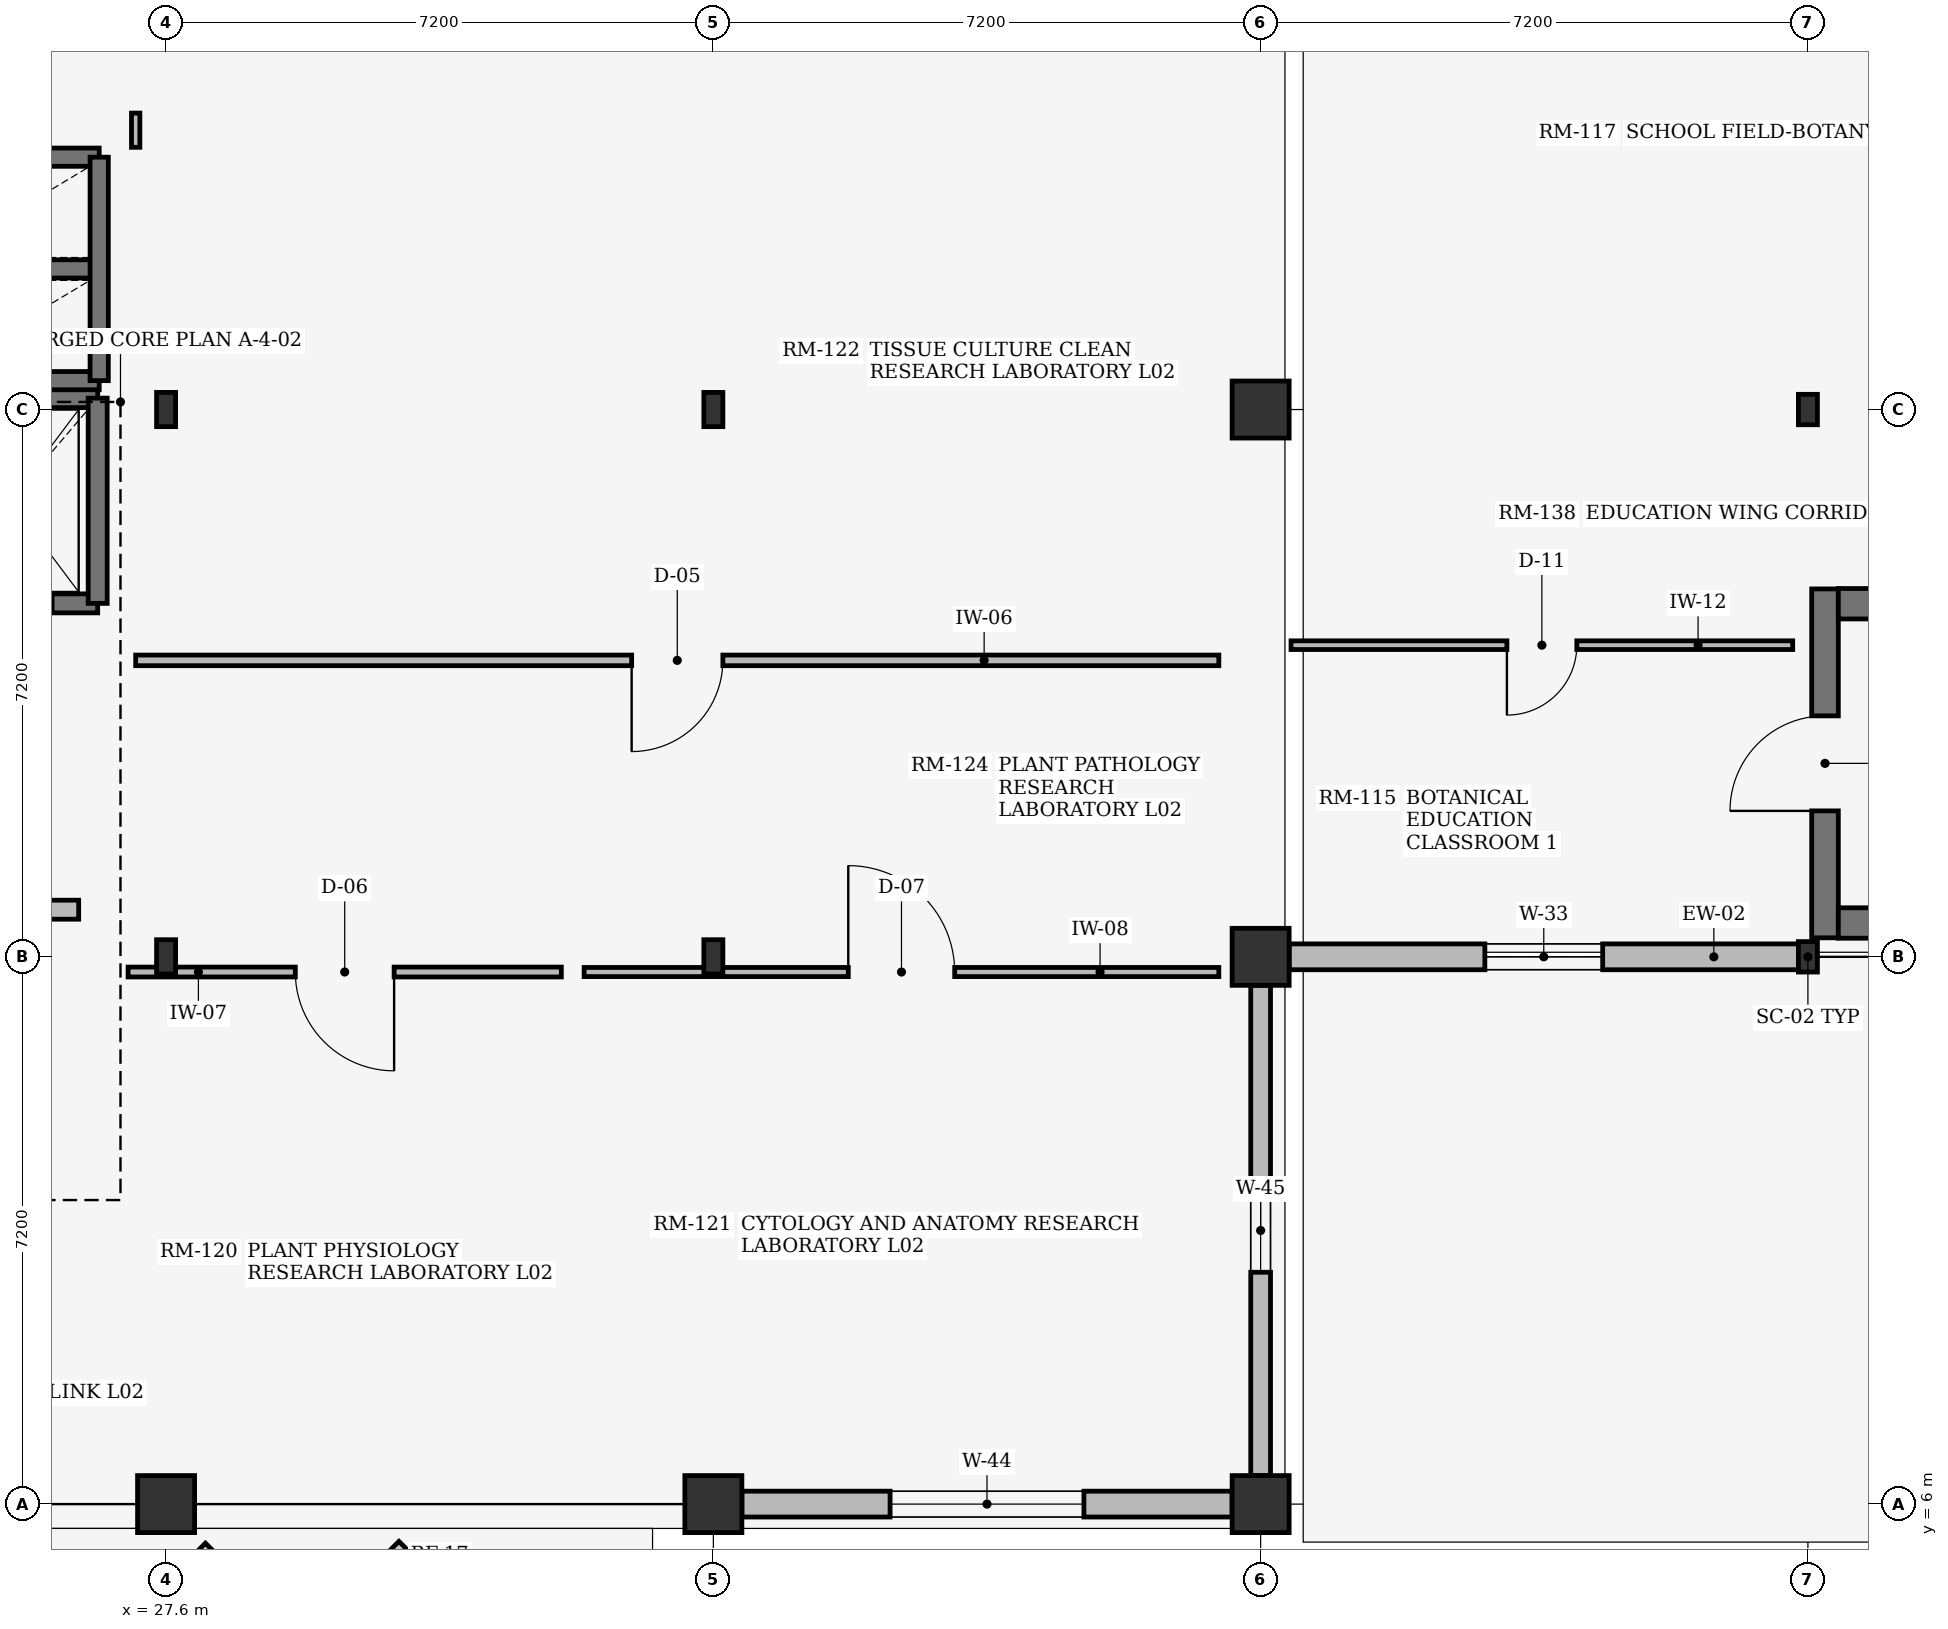
"""IFC4 building model, lengths in metres.
Left out: names, types, materials, properties, quantities, classifications, styles, units other than length and angle.
Written with IfcOpenShell. Run it as: python <this file> out.ifc"""

import sys

from ifc_helpers import new_model, si_unit, direction, frame, frame_2d, origin, origin_2d, place, context, subcontext, project, spatial, rectangle, i_section, extrude, element, fill, save


model = new_model("IFC4")
c1 = context("Model", 3, precision=1e-05, world=origin(), true_north=direction((0.0, 1.0)))
c2 = subcontext(c1, "Body", "Model", "MODEL_VIEW")
j1 = project(units=[si_unit("LENGTHUNIT", "METRE"), si_unit("PLANEANGLEUNIT", "RADIAN")], contexts=[c1])
p1 = place(None, origin())
s1 = spatial("IfcSite", under=j1, at=p1, CompositionType="ELEMENT")
p2 = place(p1, origin())
s2 = spatial("IfcBuilding", under=s1, at=p2, CompositionType="ELEMENT")
p3 = place(p2, frame((0.0, 0.0, 9.0)))
s3 = spatial("IfcBuildingStorey", under=s2, at=p3, CompositionType="ELEMENT", Elevation=9.0)
p4 = place(p3, frame((27.6, 6.0, 0.0), z_axis=(0.0, 0.0, 1.0), x_axis=(1.0, 0.0, 0.0)))
e1 = element("IfcColumn", 1, at=p4, inside=s3, PredefinedType="COLUMN", context=c2, shape_type="SweptSolid", body=[
    extrude(rectangle(XDim=0.75, YDim=0.75, at=origin_2d()), origin(), (0.0, 0.0, 1.0), 3.96),
])
for number, where, z_axis, x_axis in (
    (2, (27.6, 13.2, 0.0), (0.0, 0.0, 1.0), (1.0, 0.0, 0.0)),
    (3, (27.6, 20.4, 0.0), (0.0, 0.0, 1.0), (1.0, 0.0, 0.0)),
):
    element("IfcColumn", number, at=place(p3, frame(where, z_axis=z_axis, x_axis=x_axis)), inside=s3, PredefinedType="COLUMN", context=c2, shape_type="SweptSolid", body=[
        extrude(i_section(OverallWidth=0.25, OverallDepth=0.45, WebThickness=0.011, FlangeThickness=0.014, at=origin_2d()), origin(), (0.0, 0.0, 1.0), 3.96),
    ])
p5 = place(p3, frame((34.8, 6.0, 0.0), z_axis=(0.0, 0.0, 1.0), x_axis=(1.0, 0.0, 0.0)))
e4 = element("IfcColumn", 4, at=p5, inside=s3, PredefinedType="COLUMN", context=c2, shape_type="SweptSolid", body=[
    extrude(rectangle(XDim=0.75, YDim=0.75, at=origin_2d()), origin(), (0.0, 0.0, 1.0), 3.96),
])
for number, where, z_axis, x_axis in (
    (5, (34.8, 13.2, 0.0), (0.0, 0.0, 1.0), (1.0, 0.0, 0.0)),
    (6, (34.8, 20.4, 0.0), (0.0, 0.0, 1.0), (1.0, 0.0, 0.0)),
):
    element("IfcColumn", number, at=place(p3, frame(where, z_axis=z_axis, x_axis=x_axis)), inside=s3, PredefinedType="COLUMN", context=c2, shape_type="SweptSolid", body=[
        extrude(i_section(OverallWidth=0.25, OverallDepth=0.45, WebThickness=0.011, FlangeThickness=0.014, at=origin_2d()), origin(), (0.0, 0.0, 1.0), 3.96),
    ])
for number, where, z_axis, x_axis in (
    (7, (42.0, 6.0, 0.0), (0.0, 0.0, 1.0), (1.0, 0.0, 0.0)),
    (8, (42.0, 13.2, 0.0), (0.0, 0.0, 1.0), (1.0, 0.0, 0.0)),
    (9, (42.0, 20.4, 0.0), (0.0, 0.0, 1.0), (1.0, 0.0, 0.0)),
):
    element("IfcColumn", number, at=place(p3, frame(where, z_axis=z_axis, x_axis=x_axis)), inside=s3, PredefinedType="COLUMN", context=c2, shape_type="SweptSolid", body=[
        extrude(rectangle(XDim=0.75, YDim=0.75, at=origin_2d()), origin(), (0.0, 0.0, 1.0), 3.96),
    ])
for number, where, z_axis, x_axis in (
    (10, (49.2, 13.2, 0.0), (0.0, 0.0, 1.0), (1.0, 0.0, 0.0)),
    (11, (49.2, 20.4, 0.0), (0.0, 0.0, 1.0), (1.0, 0.0, 0.0)),
):
    element("IfcColumn", number, at=place(p3, frame(where, z_axis=z_axis, x_axis=x_axis)), inside=s3, PredefinedType="COLUMN", context=c2, shape_type="SweptSolid", body=[
        extrude(i_section(OverallWidth=0.25, OverallDepth=0.4, WebThickness=0.01, FlangeThickness=0.013, at=origin_2d()), origin(), (0.0, 0.0, 1.0), 3.96),
    ])
p6 = place(p3, frame((42.375, 13.2, 0.0), z_axis=(0.0, 0.0, 1.0), x_axis=(1.0, 0.0, 0.0)))
e12 = element("IfcWall", 12, at=p6, inside=s3, PredefinedType="STANDARD", context=c2, shape_type="SweptSolid", body=[
    extrude(rectangle(XDim=6.7, YDim=0.34, at=frame_2d((3.35, 0.0))), origin(), (0.0, 0.0, 1.0), 3.42),
])
p7 = place(p6, frame((2.575, 0.0, 0.75)))
e13 = element("IfcOpeningElement", 13, at=p7, cuts=e12, PredefinedType="OPENING", context=c2, shape_type="SweptSolid", body=[
    extrude(rectangle(XDim=1.55, YDim=1.35, at=frame_2d((0.775, 0.675))), frame((0.0, 0.18, 0.0), z_axis=(0.0, -1.0, 0.0), x_axis=(1.0, 0.0, 0.0)), (0.0, 0.0, 1.0), 0.36),
])
p8 = place(p3, frame((35.175, 6.0, 0.0), z_axis=(0.0, 0.0, 1.0), x_axis=(1.0, 0.0, 0.0)))
e14 = element("IfcWall", 14, at=p8, inside=s3, PredefinedType="STANDARD", context=c2, shape_type="SweptSolid", body=[
    extrude(rectangle(XDim=6.45, YDim=0.34, at=frame_2d((3.225, 0.0))), origin(), (0.0, 0.0, 1.0), 3.34),
])
p9 = place(p8, frame((1.95, 0.0, 0.75)))
e15 = element("IfcOpeningElement", 15, at=p9, cuts=e14, PredefinedType="OPENING", context=c2, shape_type="SweptSolid", body=[
    extrude(rectangle(XDim=2.55, YDim=1.5, at=frame_2d((1.275, 0.75))), frame((0.0, 0.18, 0.0), z_axis=(0.0, -1.0, 0.0), x_axis=(1.0, 0.0, 0.0)), (0.0, 0.0, 1.0), 0.36),
])
p10 = place(p3, frame((42.0, 6.375, 0.0), z_axis=(0.0, 0.0, 1.0), x_axis=(0.0, 1.0, 0.0)))
e16 = element("IfcWall", 16, at=p10, inside=s3, PredefinedType="STANDARD", context=c2, shape_type="SweptSolid", body=[
    extrude(rectangle(XDim=6.45, YDim=0.26, at=frame_2d((3.225, 0.0))), origin(), (0.0, 0.0, 1.0), 3.34),
])
p11 = place(p10, frame((2.675, 0.0, 0.75)))
e17 = element("IfcOpeningElement", 17, at=p11, cuts=e16, PredefinedType="OPENING", context=c2, shape_type="SweptSolid", body=[
    extrude(rectangle(XDim=1.1, YDim=1.25, at=frame_2d((0.55, 0.625))), frame((0.0, 0.14, 0.0), z_axis=(0.0, -1.0, 0.0), x_axis=(1.0, 0.0, 0.0)), (0.0, 0.0, 1.0), 0.28),
])
p12 = place(p3, frame((49.425, 13.45, 0.0), z_axis=(0.0, 0.0, 1.0), x_axis=(0.0, 1.0, 0.0)))
e18 = element("IfcWall", 18, at=p12, inside=s3, PredefinedType="SHEAR", context=c2, shape_type="SweptSolid", body=[
    extrude(rectangle(XDim=4.59, YDim=0.35, at=frame_2d((2.295, 0.0))), origin(), (0.0, 0.0, 1.0), 3.96),
])
p13 = place(p12, frame((1.67, 0.0, 0.0)))
e19 = element("IfcOpeningElement", 19, at=p13, cuts=e18, PredefinedType="OPENING", context=c2, shape_type="SweptSolid", body=[
    extrude(rectangle(XDim=1.25, YDim=2.2, at=frame_2d((0.625, 1.1))), frame((0.0, 0.185, 0.0), z_axis=(0.0, -1.0, 0.0), x_axis=(1.0, 0.0, 0.0)), (0.0, 0.0, 1.0), 0.37),
])
for number, where, z_axis, x_axis in (
    (20, (49.6, 13.645, 0.0), (0.0, 0.0, 1.0), (1.0, 0.0, 0.0)),
    (21, (49.6, 17.845, 0.0), (0.0, 0.0, 1.0), (1.0, 0.0, 0.0)),
):
    element("IfcWall", number, at=place(p3, frame(where, z_axis=z_axis, x_axis=x_axis)), inside=s3, PredefinedType="SHEAR", context=c2, shape_type="SweptSolid", body=[
        extrude(rectangle(XDim=7.98, YDim=0.4, at=frame_2d((3.99, 0.0))), origin(), (0.0, 0.0, 1.0), 3.96),
    ])
p14 = place(p3, frame((24.4, 17.85, 0.0), z_axis=(0.0, 0.0, 1.0), x_axis=(1.0, 0.0, 0.0)))
e22 = element("IfcWall", 22, at=p14, inside=s3, PredefinedType="SHEAR", context=c2, shape_type="SweptSolid", body=[
    extrude(rectangle(XDim=2.3, YDim=0.25, at=frame_2d((1.15, 0.0))), origin(), (0.0, 0.0, 1.0), 3.96),
])
p15 = place(p14, frame((0.6, 0.0, 0.0)))
e23 = element("IfcOpeningElement", 23, at=p15, cuts=e22, PredefinedType="OPENING", context=c2, shape_type="SweptSolid", body=[
    extrude(rectangle(XDim=1.1, YDim=2.2, at=frame_2d((0.55, 1.1))), frame((0.0, 0.135, 0.0), z_axis=(0.0, -1.0, 0.0), x_axis=(1.0, 0.0, 0.0)), (0.0, 0.0, 1.0), 0.27),
])
p16 = place(p3, frame((24.4, 20.55, 0.0), z_axis=(0.0, 0.0, 1.0), x_axis=(1.0, 0.0, 0.0)))
e24 = element("IfcWall", 24, at=p16, inside=s3, PredefinedType="SHEAR", context=c2, shape_type="SweptSolid", body=[
    extrude(rectangle(XDim=2.3, YDim=0.25, at=frame_2d((1.15, 0.0))), origin(), (0.0, 0.0, 1.0), 3.96),
])
p17 = place(p3, frame((26.7, 17.85, 0.0), z_axis=(0.0, 0.0, 1.0), x_axis=(0.0, 1.0, 0.0)))
e25 = element("IfcWall", 25, at=p17, inside=s3, PredefinedType="SHEAR", context=c2, shape_type="SweptSolid", body=[
    extrude(rectangle(XDim=2.7, YDim=0.25, at=frame_2d((1.35, 0.0))), origin(), (0.0, 0.0, 1.0), 3.96),
])
for number, where, z_axis, x_axis in (
    (26, (24.48, 20.78, 0.0), (0.0, 0.0, 1.0), (1.0, 0.0, 0.0)),
    (27, (24.48, 22.25, 0.0), (0.0, 0.0, 1.0), (1.0, 0.0, 0.0)),
    (28, (24.48, 23.72, 0.0), (0.0, 0.0, 1.0), (1.0, 0.0, 0.0)),
):
    element("IfcWall", number, at=place(p3, frame(where, z_axis=z_axis, x_axis=x_axis)), inside=s3, PredefinedType="SHEAR", context=c2, shape_type="SweptSolid", body=[
        extrude(rectangle(XDim=2.24, YDim=0.24, at=frame_2d((1.12, 0.0))), origin(), (0.0, 0.0, 1.0), 3.96),
    ])
p18 = place(p3, frame((26.72, 20.78, 0.0), z_axis=(0.0, 0.0, 1.0), x_axis=(0.0, 1.0, 0.0)))
e29 = element("IfcWall", 29, at=p18, inside=s3, PredefinedType="SHEAR", context=c2, shape_type="SweptSolid", body=[
    extrude(rectangle(XDim=2.94, YDim=0.24, at=frame_2d((1.47, 0.0))), origin(), (0.0, 0.0, 1.0), 3.96),
])
p19 = place(p3, frame((24.45, 13.82, 0.0), z_axis=(0.0, 0.0, 1.0), x_axis=(1.0, 0.0, 0.0)))
e30 = element("IfcWall", 30, at=p19, inside=s3, PredefinedType="SOLIDWALL", context=c2, shape_type="SweptSolid", body=[
    extrude(rectangle(XDim=2.0, YDim=0.25, at=frame_2d((1.0, 0.0))), origin(), (0.0, 0.0, 1.0), 3.94),
])
p20 = place(p3, frame((27.2, 17.1, 0.0), z_axis=(0.0, 0.0, 1.0), x_axis=(1.0, 0.0, 0.0)))
e31 = element("IfcWall", 31, at=p20, inside=s3, PredefinedType="PARTITIONING", context=c2, shape_type="SweptSolid", body=[
    extrude(rectangle(XDim=14.25, YDim=0.14, at=frame_2d((7.125, 0.0))), origin(), (0.0, 0.0, 1.0), 3.94),
])
p21 = place(p20, frame((6.525, 0.0, 0.0)))
e32 = element("IfcOpeningElement", 32, at=p21, cuts=e31, PredefinedType="OPENING", context=c2, shape_type="SweptSolid", body=[
    extrude(rectangle(XDim=1.2, YDim=2.2, at=frame_2d((0.6, 1.1))), frame((0.0, 0.08, 0.0), z_axis=(0.0, -1.0, 0.0), x_axis=(1.0, 0.0, 0.0)), (0.0, 0.0, 1.0), 0.16),
])
p22 = place(p3, frame((27.1, 13.0, 0.0), z_axis=(0.0, 0.0, 1.0), x_axis=(1.0, 0.0, 0.0)))
e33 = element("IfcWall", 33, at=p22, inside=s3, PredefinedType="PARTITIONING", context=c2, shape_type="SweptSolid", body=[
    extrude(rectangle(XDim=5.7, YDim=0.13, at=frame_2d((2.85, 0.0))), origin(), (0.0, 0.0, 1.0), 3.94),
])
p23 = place(p22, frame((2.2, 0.0, 0.0)))
e34 = element("IfcOpeningElement", 34, at=p23, cuts=e33, PredefinedType="OPENING", context=c2, shape_type="SweptSolid", body=[
    extrude(rectangle(XDim=1.3, YDim=2.2, at=frame_2d((0.65, 1.1))), frame((0.0, 0.075, 0.0), z_axis=(0.0, -1.0, 0.0), x_axis=(1.0, 0.0, 0.0)), (0.0, 0.0, 1.0), 0.15),
])
p24 = place(p3, frame((33.1, 13.0, 0.0), z_axis=(0.0, 0.0, 1.0), x_axis=(1.0, 0.0, 0.0)))
e35 = element("IfcWall", 35, at=p24, inside=s3, PredefinedType="PARTITIONING", context=c2, shape_type="SweptSolid", body=[
    extrude(rectangle(XDim=8.35, YDim=0.12, at=frame_2d((4.175, 0.0))), origin(), (0.0, 0.0, 1.0), 3.94),
])
p25 = place(p24, frame((3.475, 0.0, 0.0)))
e36 = element("IfcOpeningElement", 36, at=p25, cuts=e35, PredefinedType="OPENING", context=c2, shape_type="SweptSolid", body=[
    extrude(rectangle(XDim=1.4, YDim=2.25, at=frame_2d((0.7, 1.125))), frame((0.0, 0.07, 0.0), z_axis=(0.0, -1.0, 0.0), x_axis=(1.0, 0.0, 0.0)), (0.0, 0.0, 1.0), 0.14),
])
p26 = place(p3, frame((27.2, 24.3, 0.0), z_axis=(0.0, 0.0, 1.0), x_axis=(0.0, -1.0, 0.0)))
e37 = element("IfcWall", 37, at=p26, inside=s3, PredefinedType="PARTITIONING", context=c2, shape_type="SweptSolid", body=[
    extrude(rectangle(XDim=0.45, YDim=0.11, at=frame_2d((0.225, 0.0))), origin(), (0.0, 0.0, 1.0), 3.94),
])
p27 = place(p3, frame((42.4, 17.3, 0.0), z_axis=(0.0, 0.0, 1.0), x_axis=(1.0, 0.0, 0.0)))
e38 = element("IfcWall", 38, at=p27, inside=s3, PredefinedType="PARTITIONING", context=c2, shape_type="SweptSolid", body=[
    extrude(rectangle(XDim=6.6, YDim=0.114, at=frame_2d((3.3, 0.0))), origin(), (0.0, 0.0, 1.0), 3.94),
])
p28 = place(p27, frame((2.84, 0.0, 0.0)))
e39 = element("IfcOpeningElement", 39, at=p28, cuts=e38, PredefinedType="OPENING", context=c2, shape_type="SweptSolid", body=[
    extrude(rectangle(XDim=0.92, YDim=2.1, at=frame_2d((0.46, 1.05))), frame((0.0, 0.067, 0.0), z_axis=(0.0, -1.0, 0.0), x_axis=(1.0, 0.0, 0.0)), (0.0, 0.0, 1.0), 0.134),
])
p29 = place(p7, origin())
e40 = element("IfcWindow", 40, at=p29, inside=s3, PartitioningType="SINGLE_PANEL", PredefinedType="WINDOW", context=c2, shape_type="SweptSolid", body=[
    extrude(rectangle(XDim=1.55, YDim=1.35, at=frame_2d((0.775, 0.675))), frame((0.0, 0.03, 0.0), z_axis=(0.0, -1.0, 0.0), x_axis=(1.0, 0.0, 0.0)), (0.0, 0.0, 1.0), 0.06),
])
fill(e13, e40)
p30 = place(p9, origin())
e41 = element("IfcWindow", 41, at=p30, inside=s3, PartitioningType="SINGLE_PANEL", PredefinedType="WINDOW", context=c2, shape_type="SweptSolid", body=[
    extrude(rectangle(XDim=2.55, YDim=1.5, at=frame_2d((1.275, 0.75))), frame((0.0, 0.03, 0.0), z_axis=(0.0, -1.0, 0.0), x_axis=(1.0, 0.0, 0.0)), (0.0, 0.0, 1.0), 0.06),
])
fill(e15, e41)
p31 = place(p11, origin())
e42 = element("IfcWindow", 42, at=p31, inside=s3, PartitioningType="SINGLE_PANEL", PredefinedType="WINDOW", context=c2, shape_type="SweptSolid", body=[
    extrude(rectangle(XDim=1.1, YDim=1.25, at=frame_2d((0.55, 0.625))), frame((0.0, 0.03, 0.0), z_axis=(0.0, -1.0, 0.0), x_axis=(1.0, 0.0, 0.0)), (0.0, 0.0, 1.0), 0.06),
])
fill(e17, e42)
p32 = place(p13, origin())
e43 = element("IfcDoor", 43, at=p32, inside=s3, OperationType="SINGLE_SWING_LEFT", PredefinedType="DOOR", context=c2, shape_type="SweptSolid", body=[
    extrude(rectangle(XDim=1.25, YDim=2.2, at=frame_2d((0.625, 1.1))), frame((0.0, 0.025, 0.0), z_axis=(0.0, -1.0, 0.0), x_axis=(1.0, 0.0, 0.0)), (0.0, 0.0, 1.0), 0.05),
])
fill(e19, e43)
p33 = place(p21, frame((1.2, 0.0, 0.0), z_axis=(0.0, 0.0, 1.0), x_axis=(-1.0, 0.0, 0.0)))
e44 = element("IfcDoor", 44, at=p33, inside=s3, OperationType="SINGLE_SWING_LEFT", PredefinedType="DOOR", context=c2, shape_type="SweptSolid", body=[
    extrude(rectangle(XDim=1.2, YDim=2.2, at=frame_2d((0.6, 1.1))), frame((0.0, 0.025, 0.0), z_axis=(0.0, -1.0, 0.0), x_axis=(1.0, 0.0, 0.0)), (0.0, 0.0, 1.0), 0.05),
])
fill(e32, e44)
p34 = place(p23, origin())
e45 = element("IfcDoor", 45, at=p34, inside=s3, OperationType="SINGLE_SWING_RIGHT", PredefinedType="DOOR", context=c2, shape_type="SweptSolid", body=[
    extrude(rectangle(XDim=1.3, YDim=2.2, at=frame_2d((0.65, 1.1))), frame((0.0, 0.025, 0.0), z_axis=(0.0, -1.0, 0.0), x_axis=(1.0, 0.0, 0.0)), (0.0, 0.0, 1.0), 0.05),
])
fill(e34, e45)
p35 = place(p25, origin())
e46 = element("IfcDoor", 46, at=p35, inside=s3, OperationType="SINGLE_SWING_LEFT", PredefinedType="DOOR", context=c2, shape_type="SweptSolid", body=[
    extrude(rectangle(XDim=1.4, YDim=2.25, at=frame_2d((0.7, 1.125))), frame((0.0, 0.025, 0.0), z_axis=(0.0, -1.0, 0.0), x_axis=(1.0, 0.0, 0.0)), (0.0, 0.0, 1.0), 0.05),
])
fill(e36, e46)
p36 = place(p28, frame((0.92, 0.0, 0.0), z_axis=(0.0, 0.0, 1.0), x_axis=(-1.0, 0.0, 0.0)))
e47 = element("IfcDoor", 47, at=p36, inside=s3, OperationType="SINGLE_SWING_LEFT", PredefinedType="DOOR", context=c2, shape_type="SweptSolid", body=[
    extrude(rectangle(XDim=0.92, YDim=2.1, at=frame_2d((0.46, 1.05))), frame((0.0, 0.025, 0.0), z_axis=(0.0, -1.0, 0.0), x_axis=(1.0, 0.0, 0.0)), (0.0, 0.0, 1.0), 0.05),
])
fill(e39, e47)
save(model, sys.argv[1])
